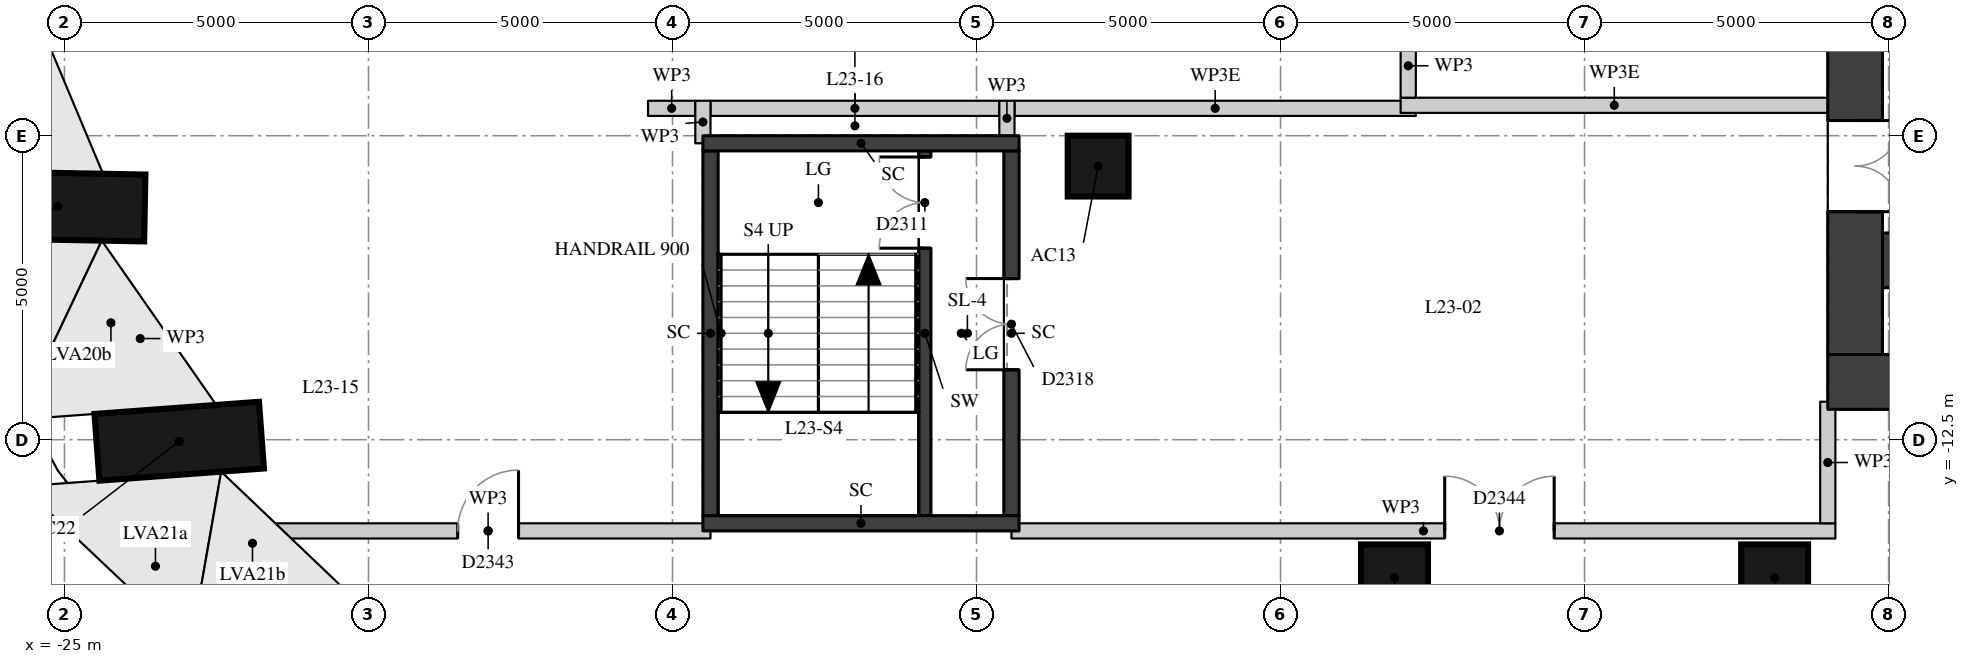
"""IFC4 building model, lengths in metres.
Left out: names, types, materials, properties, quantities, classifications, styles, units other than length and angle.
Written with IfcOpenShell. Run it as: python <this file> out.ifc"""

import sys

from ifc_helpers import new_model, si_unit, direction, frame, frame_2d, origin, origin_2d, place, context, subcontext, project, spatial, rectangle, extrude, element, fill, save


model = new_model("IFC4")
c1 = context("Model", 3, precision=1e-05, world=origin(), true_north=direction((0.0, 1.0)))
c2 = subcontext(c1, "Body", "Model", "MODEL_VIEW")
j1 = project(units=[si_unit("LENGTHUNIT", "METRE"), si_unit("PLANEANGLEUNIT", "RADIAN")], contexts=[c1])
p1 = place(None, origin())
s1 = spatial("IfcSite", under=j1, at=p1, CompositionType="ELEMENT")
p2 = place(p1, origin())
s2 = spatial("IfcBuilding", under=s1, at=p2, CompositionType="ELEMENT")
p3 = place(p2, frame((0.0, 0.0, 84.4)))
s3 = spatial("IfcBuildingStorey", under=s2, at=p3, CompositionType="ELEMENT", Elevation=84.4)
p4 = place(p3, frame((-26.546, -8.636, 0.471), z_axis=(0.627366064444, -0.011537766702, 0.778639005653), x_axis=(-0.778507362744, 0.014317376786, 0.627472149881)))
e1 = element("IfcColumn", 1, at=p4, inside=s3, PredefinedType="COLUMN", context=c2, shape_type="SweptSolid", body=[
    extrude(rectangle(XDim=1.5, YDim=1.1, at=origin_2d()), origin(), (0.0, 0.0, 1.0), 4.571),
])
p5 = place(p3, frame((-24.465, -12.625, 0.452), z_axis=(0.600492037274, 0.044382544764, 0.798398085476), x_axis=(-0.796226262122, -0.058849319437, 0.602129966958)))
e2 = element("IfcColumn", 2, at=p5, inside=s3, PredefinedType="COLUMN", context=c2, shape_type="SweptSolid", body=[
    extrude(rectangle(XDim=1.5, YDim=1.1, at=origin_2d()), origin(), (0.0, 0.0, 1.0), 4.505),
])
p6 = place(p3, frame((-8.0, -8.0, 0.0), z_axis=(0.0, 0.0, 1.0), x_axis=(1.0, 0.0, 0.0)))
e3 = element("IfcColumn", 3, at=p6, inside=s3, PredefinedType="COLUMN", context=c2, shape_type="SweptSolid", body=[
    extrude(rectangle(XDim=1.0, YDim=1.0, at=origin_2d()), origin(), (0.0, 0.0, 1.0), 4.5),
])
for number, where, z_axis, x_axis in (
    (4, (-3.126, -14.772, 0.0), (0.0, 0.0, 1.0), (1.0, 0.0, 0.0)),
    (5, (3.126, -14.772, 0.0), (0.0, 0.0, 1.0), (1.0, 0.0, 0.0)),
):
    element("IfcColumn", number, at=place(p3, frame(where, z_axis=z_axis, x_axis=x_axis)), inside=s3, PredefinedType="COLUMN", context=c2, shape_type="SweptSolid", body=[
        extrude(rectangle(XDim=1.1, YDim=1.1, at=origin_2d()), origin(), (0.0, 0.0, 1.0), 4.5),
    ])
p7 = place(p3, frame((4.45, -11.1, 0.0), z_axis=(0.0, 0.0, 1.0), x_axis=(0.0, 1.0, 0.0)))
e6 = element("IfcWall", 6, at=p7, inside=s3, PredefinedType="SHEAR", context=c2, shape_type="SweptSolid", body=[
    extrude(rectangle(XDim=22.2, YDim=0.9, at=frame_2d((11.1, 0.0))), origin(), (0.0, 0.0, 1.0), 4.22),
])
p8 = place(p7, frame((2.35, 0.0, 0.0)))
e7 = element("IfcOpeningElement", 7, at=p8, cuts=e6, PredefinedType="OPENING", context=c2, shape_type="SweptSolid", body=[
    extrude(rectangle(XDim=1.5, YDim=2.1, at=frame_2d((0.75, 1.05))), frame((0.0, 0.46, 0.0), z_axis=(0.0, -1.0, 0.0), x_axis=(1.0, 0.0, 0.0)), (0.0, 0.0, 1.0), 0.92),
])
p9 = place(p7, frame((5.45, 0.0, 0.0)))
e8 = element("IfcOpeningElement", 8, at=p9, cuts=e6, PredefinedType="OPENING", context=c2, shape_type="SweptSolid", body=[
    extrude(rectangle(XDim=1.8, YDim=2.1, at=frame_2d((0.9, 1.05))), frame((0.0, 0.46, 0.0), z_axis=(0.0, -1.0, 0.0), x_axis=(1.0, 0.0, 0.0)), (0.0, 0.0, 1.0), 0.92),
])
p10 = place(p7, frame((7.95, 0.0, 0.0)))
e9 = element("IfcOpeningElement", 9, at=p10, cuts=e6, PredefinedType="OPENING", context=c2, shape_type="SweptSolid", body=[
    extrude(rectangle(XDim=1.1, YDim=2.1, at=frame_2d((0.55, 1.05))), frame((0.0, 0.46, 0.0), z_axis=(0.0, -1.0, 0.0), x_axis=(1.0, 0.0, 0.0)), (0.0, 0.0, 1.0), 0.92),
])
p11 = place(p7, frame((10.6, 0.0, 0.0)))
e10 = element("IfcOpeningElement", 10, at=p11, cuts=e6, PredefinedType="OPENING", context=c2, shape_type="SweptSolid", body=[
    extrude(rectangle(XDim=1.0, YDim=2.1, at=frame_2d((0.5, 1.05))), frame((0.0, 0.46, 0.0), z_axis=(0.0, -1.0, 0.0), x_axis=(1.0, 0.0, 0.0)), (0.0, 0.0, 1.0), 0.92),
])
p12 = place(p7, frame((13.15, 0.0, 0.0)))
e11 = element("IfcOpeningElement", 11, at=p12, cuts=e6, PredefinedType="OPENING", context=c2, shape_type="SweptSolid", body=[
    extrude(rectangle(XDim=1.1, YDim=2.1, at=frame_2d((0.55, 1.05))), frame((0.0, 0.46, 0.0), z_axis=(0.0, -1.0, 0.0), x_axis=(1.0, 0.0, 0.0)), (0.0, 0.0, 1.0), 0.92),
])
p13 = place(p7, frame((14.95, 0.0, 0.0)))
e12 = element("IfcOpeningElement", 12, at=p13, cuts=e6, PredefinedType="OPENING", context=c2, shape_type="SweptSolid", body=[
    extrude(rectangle(XDim=1.8, YDim=2.1, at=frame_2d((0.9, 1.05))), frame((0.0, 0.46, 0.0), z_axis=(0.0, -1.0, 0.0), x_axis=(1.0, 0.0, 0.0)), (0.0, 0.0, 1.0), 0.92),
])
p14 = place(p7, frame((18.35, 0.0, 0.0)))
e13 = element("IfcOpeningElement", 13, at=p14, cuts=e6, PredefinedType="OPENING", context=c2, shape_type="SweptSolid", body=[
    extrude(rectangle(XDim=1.5, YDim=2.1, at=frame_2d((0.75, 1.05))), frame((0.0, 0.46, 0.0), z_axis=(0.0, -1.0, 0.0), x_axis=(1.0, 0.0, 0.0)), (0.0, 0.0, 1.0), 0.92),
])
p15 = place(p3, frame((4.0, -11.55, 0.0), z_axis=(0.0, 0.0, 1.0), x_axis=(1.0, 0.0, 0.0)))
e14 = element("IfcWall", 14, at=p15, inside=s3, PredefinedType="SHEAR", context=c2, shape_type="SweptSolid", body=[
    extrude(rectangle(XDim=15.2, YDim=0.9, at=frame_2d((7.6, 0.0))), origin(), (0.0, 0.0, 1.0), 4.22),
])
p16 = place(p3, frame((4.9, -9.55, 0.0), z_axis=(0.0, 0.0, 1.0), x_axis=(1.0, 0.0, 0.0)))
e15 = element("IfcWall", 15, at=p16, inside=s3, PredefinedType="SHEAR", context=c2, shape_type="SweptSolid", body=[
    extrude(rectangle(XDim=10.2, YDim=0.9, at=frame_2d((5.1, 0.0))), origin(), (0.0, 0.0, 1.0), 4.22),
])
p17 = place(p3, frame((-10.85, -13.75, 0.0), z_axis=(0.0, 0.0, 1.0), x_axis=(0.0, 1.0, 0.0)))
e16 = element("IfcWall", 16, at=p17, inside=s3, PredefinedType="SHEAR", context=c2, shape_type="SweptSolid", body=[
    extrude(rectangle(XDim=6.0, YDim=0.2, at=frame_2d((3.0, 0.0))), origin(), (0.0, 0.0, 1.0), 4.22),
])
p18 = place(p17, frame((4.4, 0.0, 0.0)))
e17 = element("IfcOpeningElement", 17, at=p18, cuts=e16, PredefinedType="OPENING", context=c2, shape_type="SweptSolid", body=[
    extrude(rectangle(XDim=1.5, YDim=2.1, at=frame_2d((0.75, 1.05))), frame((0.0, 0.11, 0.0), z_axis=(0.0, -1.0, 0.0), x_axis=(1.0, 0.0, 0.0)), (0.0, 0.0, 1.0), 0.22),
])
p19 = place(p3, frame((-14.375, -13.75, -0.45), z_axis=(0.0, 0.0, 1.0), x_axis=(0.0, 1.0, 0.0)))
e18 = element("IfcWall", 18, at=p19, inside=s3, PredefinedType="SHEAR", context=c2, shape_type="SweptSolid", body=[
    extrude(rectangle(XDim=6.0, YDim=0.25, at=frame_2d((3.0, 0.0))), origin(), (0.0, 0.0, 1.0), 4.67),
])
p20 = place(p3, frame((-9.425, -13.75, -0.45), z_axis=(0.0, 0.0, 1.0), x_axis=(0.0, 1.0, 0.0)))
e19 = element("IfcWall", 19, at=p20, inside=s3, PredefinedType="SHEAR", context=c2, shape_type="SweptSolid", body=[
    extrude(rectangle(XDim=6.0, YDim=0.25, at=frame_2d((3.0, 0.0))), origin(), (0.0, 0.0, 1.0), 4.67),
])
p21 = place(p20, frame((2.4, 0.0, 0.45)))
e20 = element("IfcOpeningElement", 20, at=p21, cuts=e19, PredefinedType="OPENING", context=c2, shape_type="SweptSolid", body=[
    extrude(rectangle(XDim=1.5, YDim=2.1, at=frame_2d((0.75, 1.05))), frame((0.0, 0.135, 0.0), z_axis=(0.0, -1.0, 0.0), x_axis=(1.0, 0.0, 0.0)), (0.0, 0.0, 1.0), 0.27),
])
for number, where, z_axis, x_axis in (
    (21, (-14.5, -7.625, -0.45), (0.0, 0.0, 1.0), (1.0, 0.0, 0.0)),
    (22, (-14.5, -13.875, -0.45), (0.0, 0.0, 1.0), (1.0, 0.0, 0.0)),
):
    element("IfcWall", number, at=place(p3, frame(where, z_axis=z_axis, x_axis=x_axis)), inside=s3, PredefinedType="SHEAR", context=c2, shape_type="SweptSolid", body=[
        extrude(rectangle(XDim=5.2, YDim=0.25, at=frame_2d((2.6, 0.0))), origin(), (0.0, 0.0, 1.0), 4.67),
    ])
p22 = place(p3, frame((-24.348, -9.7, 0.0), z_axis=(0.0, 0.0, 1.0), x_axis=(0.46384696326, -0.885915342837, 0.0)))
e23 = element("IfcWall", 23, at=p22, inside=s3, PredefinedType="PARTITIONING", context=c2, shape_type="SweptSolid", body=[
    extrude(rectangle(XDim=2.565, YDim=0.25, at=frame_2d((1.283, 0.0))), origin(), (0.0, 0.0, 1.0), 4.22),
])
p23 = place(p3, frame((-21.69, -14.0, 0.0), z_axis=(0.0, 0.0, 1.0), x_axis=(1.0, 0.0, 0.0)))
e24 = element("IfcWall", 24, at=p23, inside=s3, PredefinedType="PARTITIONING", context=c2, shape_type="SweptSolid", body=[
    extrude(rectangle(XDim=7.315, YDim=0.25, at=frame_2d((3.657, 0.0))), origin(), (0.0, 0.0, 1.0), 4.22),
])
p24 = place(p23, frame((3.158, 0.0, 0.0)))
e25 = element("IfcOpeningElement", 25, at=p24, cuts=e24, PredefinedType="OPENING", context=c2, shape_type="SweptSolid", body=[
    extrude(rectangle(XDim=1.0, YDim=2.1, at=frame_2d((0.5, 1.05))), frame((0.0, 0.135, 0.0), z_axis=(0.0, -1.0, 0.0), x_axis=(1.0, 0.0, 0.0)), (0.0, 0.0, 1.0), 0.27),
])
p25 = place(p3, frame((-9.425, -14.0, 0.0), z_axis=(0.0, 0.0, 1.0), x_axis=(1.0, 0.0, 0.0)))
e26 = element("IfcWall", 26, at=p25, inside=s3, PredefinedType="PARTITIONING", context=c2, shape_type="SweptSolid", body=[
    extrude(rectangle(XDim=13.55, YDim=0.25, at=frame_2d((6.775, 0.0))), origin(), (0.0, 0.0, 1.0), 4.22),
])
p26 = place(p25, frame((7.125, 0.0, 0.0)))
e27 = element("IfcOpeningElement", 27, at=p26, cuts=e26, PredefinedType="OPENING", context=c2, shape_type="SweptSolid", body=[
    extrude(rectangle(XDim=1.8, YDim=2.1, at=frame_2d((0.9, 1.05))), frame((0.0, 0.135, 0.0), z_axis=(0.0, -1.0, 0.0), x_axis=(1.0, 0.0, 0.0)), (0.0, 0.0, 1.0), 0.27),
])
p27 = place(p3, frame((-15.402, -7.05, 0.0), z_axis=(0.0, 0.0, 1.0), x_axis=(1.0, 0.0, 0.0)))
e28 = element("IfcWall", 28, at=p27, inside=s3, PredefinedType="PARTITIONING", context=c2, shape_type="SweptSolid", body=[
    extrude(rectangle(XDim=0.777, YDim=0.25, at=frame_2d((0.389, 0.0))), origin(), (0.0, 0.0, 1.0), 4.22),
])
p28 = place(p3, frame((-14.375, -7.05, 0.0), z_axis=(0.0, 0.0, 1.0), x_axis=(1.0, 0.0, 0.0)))
e29 = element("IfcWall", 29, at=p28, inside=s3, PredefinedType="PARTITIONING", context=c2, shape_type="SweptSolid", body=[
    extrude(rectangle(XDim=4.75, YDim=0.25, at=frame_2d((2.375, 0.0))), origin(), (0.0, 0.0, 1.0), 4.22),
])
p29 = place(p3, frame((-9.375, -7.05, 0.0), z_axis=(0.0, 0.0, 1.0), x_axis=(1.0, 0.0, 0.0)))
e30 = element("IfcWall", 30, at=p29, inside=s3, PredefinedType="PARTITIONING", context=c2, shape_type="SweptSolid", body=[
    extrude(rectangle(XDim=6.6, YDim=0.25, at=frame_2d((3.3, 0.0))), origin(), (0.0, 0.0, 1.0), 3.67),
])
p30 = place(p3, frame((-3.025, -7.0, 0.0), z_axis=(0.0, 0.0, 1.0), x_axis=(1.0, 0.0, 0.0)))
e31 = element("IfcWall", 31, at=p30, inside=s3, PredefinedType="PARTITIONING", context=c2, shape_type="SweptSolid", body=[
    extrude(rectangle(XDim=7.027, YDim=0.25, at=frame_2d((3.513, 0.0))), origin(), (0.0, 0.0, 1.0), 3.67),
])
p31 = place(p3, frame((-14.5, -7.625, 0.0), z_axis=(0.0, 0.0, 1.0), x_axis=(0.0, 1.0, 0.0)))
e32 = element("IfcWall", 32, at=p31, inside=s3, PredefinedType="PARTITIONING", context=c2, shape_type="SweptSolid", body=[
    extrude(rectangle(XDim=0.7, YDim=0.25, at=frame_2d((0.35, 0.0))), origin(), (0.0, 0.0, 1.0), 4.22),
])
p32 = place(p3, frame((-9.5, -7.502, 0.0), z_axis=(0.0, 0.0, 1.0), x_axis=(0.0, 1.0, 0.0)))
e33 = element("IfcWall", 33, at=p32, inside=s3, PredefinedType="PARTITIONING", context=c2, shape_type="SweptSolid", body=[
    extrude(rectangle(XDim=0.577, YDim=0.25, at=frame_2d((0.289, 0.0))), origin(), (0.0, 0.0, 1.0), 4.22),
])
p33 = place(p3, frame((-2.9, -6.875, 0.0), z_axis=(0.0, 0.0, 1.0), x_axis=(0.0, 1.0, 0.0)))
e34 = element("IfcWall", 34, at=p33, inside=s3, PredefinedType="PARTITIONING", context=c2, shape_type="SweptSolid", body=[
    extrude(rectangle(XDim=1.05, YDim=0.25, at=frame_2d((0.525, 0.0))), origin(), (0.0, 0.0, 1.0), 4.22),
])
p34 = place(p3, frame((4.0, -13.875, 0.0), z_axis=(0.0, 0.0, 1.0), x_axis=(0.0, 1.0, 0.0)))
e35 = element("IfcWall", 35, at=p34, inside=s3, PredefinedType="PARTITIONING", context=c2, shape_type="SweptSolid", body=[
    extrude(rectangle(XDim=2.0, YDim=0.25, at=frame_2d((1.0, 0.0))), origin(), (0.0, 0.0, 1.0), 4.22),
])
p35 = place(p8, origin())
e36 = element("IfcDoor", 36, at=p35, inside=s3, OperationType="DOUBLE_DOOR_SINGLE_SWING", PredefinedType="DOOR", context=c2, shape_type="SweptSolid", body=[
    extrude(rectangle(XDim=1.5, YDim=2.1, at=frame_2d((0.75, 1.05))), frame((0.0, 0.025, 0.0), z_axis=(0.0, -1.0, 0.0), x_axis=(1.0, 0.0, 0.0)), (0.0, 0.0, 1.0), 0.05),
])
fill(e7, e36)
p36 = place(p18, origin())
e37 = element("IfcDoor", 37, at=p36, inside=s3, OperationType="DOUBLE_DOOR_SINGLE_SWING", PredefinedType="DOOR", context=c2, shape_type="SweptSolid", body=[
    extrude(rectangle(XDim=1.5, YDim=2.1, at=frame_2d((0.75, 1.05))), frame((0.0, 0.025, 0.0), z_axis=(0.0, -1.0, 0.0), x_axis=(1.0, 0.0, 0.0)), (0.0, 0.0, 1.0), 0.05),
])
fill(e17, e37)
p37 = place(p21, origin())
e38 = element("IfcDoor", 38, at=p37, inside=s3, OperationType="DOUBLE_DOOR_SINGLE_SWING", PredefinedType="DOOR", context=c2, shape_type="SweptSolid", body=[
    extrude(rectangle(XDim=1.5, YDim=2.1, at=frame_2d((0.75, 1.05))), frame((0.0, 0.025, 0.0), z_axis=(0.0, -1.0, 0.0), x_axis=(1.0, 0.0, 0.0)), (0.0, 0.0, 1.0), 0.05),
])
fill(e20, e38)
p38 = place(p26, origin())
e39 = element("IfcDoor", 39, at=p38, inside=s3, OperationType="DOUBLE_DOOR_SINGLE_SWING", PredefinedType="DOOR", context=c2, shape_type="SweptSolid", body=[
    extrude(rectangle(XDim=1.8, YDim=2.1, at=frame_2d((0.9, 1.05))), frame((0.0, 0.025, 0.0), z_axis=(0.0, -1.0, 0.0), x_axis=(1.0, 0.0, 0.0)), (0.0, 0.0, 1.0), 0.05),
])
fill(e27, e39)
p39 = place(p24, origin())
e40 = element("IfcDoor", 40, at=p39, inside=s3, OperationType="SINGLE_SWING_RIGHT", PredefinedType="DOOR", context=c2, shape_type="SweptSolid", body=[
    extrude(rectangle(XDim=1.0, YDim=2.1, at=frame_2d((0.5, 1.05))), frame((0.0, 0.025, 0.0), z_axis=(0.0, -1.0, 0.0), x_axis=(1.0, 0.0, 0.0)), (0.0, 0.0, 1.0), 0.05),
])
fill(e25, e40)
save(model, sys.argv[1])
